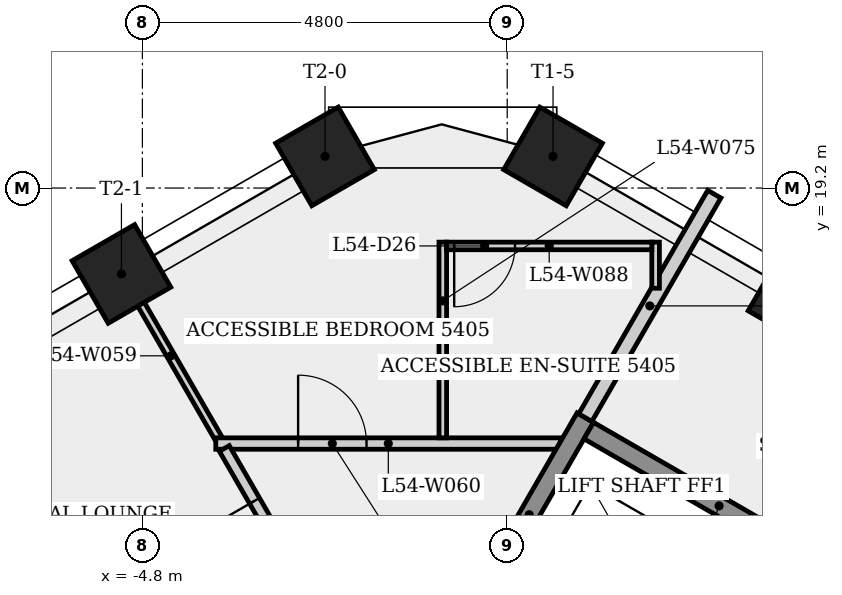
"""IFC4 building model, lengths in metres.
Left out: names, types, materials, properties, quantities, classifications, styles, units other than length and angle.
Written with IfcOpenShell. Run it as: python <this file> out.ifc"""

import sys

from ifc_helpers import new_model, si_unit, direction, frame, frame_2d, origin, origin_2d, place, context, subcontext, project, spatial, rectangle, extrude, element, fill, save


model = new_model("IFC4")
c1 = context("Model", 3, precision=1e-05, world=origin(), true_north=direction((0.0, 1.0)))
c2 = subcontext(c1, "Body", "Model", "MODEL_VIEW")
j1 = project(units=[si_unit("LENGTHUNIT", "METRE"), si_unit("PLANEANGLEUNIT", "RADIAN")], contexts=[c1])
p1 = place(None, origin())
s1 = spatial("IfcSite", under=j1, at=p1, CompositionType="ELEMENT")
p2 = place(p1, origin())
s2 = spatial("IfcBuilding", under=s1, at=p2, CompositionType="ELEMENT")
p3 = place(p2, frame((0.0, 0.0, 202.1)))
s3 = spatial("IfcBuildingStorey", under=s2, at=p3, CompositionType="ELEMENT", Elevation=202.1)
for number, where, z_axis, x_axis in (
    (1, (3.82, 17.759, 0.0), (0.0, 0.0, 1.0), (0.5, 0.866, 0.0)),
    (2, (0.603, 19.616, 0.0), (0.0, 0.0, 1.0), (0.5, 0.866, 0.0)),
    (3, (-2.397, 19.616, 0.0), (0.0, 0.0, 1.0), (-0.5, 0.866, 0.0)),
    (4, (-5.076, 18.07, 0.0), (0.0, 0.0, 1.0), (-0.5, 0.866, 0.0)),
):
    element("IfcColumn", number, at=place(p3, frame(where, z_axis=z_axis, x_axis=x_axis)), inside=s3, PredefinedType="COLUMN", context=c2, shape_type="SweptSolid", body=[
        extrude(rectangle(XDim=0.95, YDim=0.95, at=origin_2d()), origin(), (0.0, 0.0, 1.0), 4.0),
    ])
p4 = place(p3, frame((-4.266, 10.498, 0.0), z_axis=(0.0, 0.0, 1.0), x_axis=(-0.499997697262, 0.866026733267, 0.0)))
e5 = element("IfcWall", 5, at=p4, inside=s3, PredefinedType="PARTITIONING", context=c2, shape_type="SweptSolid", body=[
    extrude(rectangle(XDim=6.961, YDim=0.1, at=frame_2d((3.481, 0.0))), origin(), (0.0, 0.0, 1.0), 3.6),
])
p5 = place(p3, frame((-3.797, 15.903, 0.0), z_axis=(0.0, 0.0, 1.0), x_axis=(-0.499980071345, 0.866036909293, 0.0)))
e6 = element("IfcWall", 6, at=p5, inside=s3, PredefinedType="PARTITIONING", context=c2, shape_type="SweptSolid", body=[
    extrude(rectangle(XDim=2.516, YDim=0.1, at=frame_2d((1.258, 0.0))), origin(), (0.0, 0.0, 1.0), 3.6),
])
p6 = place(p3, frame((-3.834, 15.838, 0.0), z_axis=(0.0, 0.0, 1.0), x_axis=(1.0, 0.0, 0.0)))
e7 = element("IfcWall", 7, at=p6, inside=s3, PredefinedType="PARTITIONING", context=c2, shape_type="SweptSolid", body=[
    extrude(rectangle(XDim=4.54, YDim=0.15, at=frame_2d((2.27, 0.0))), origin(), (0.0, 0.0, 1.0), 3.6),
])
p7 = place(p6, frame((1.083, 0.0, 0.0)))
e8 = element("IfcOpeningElement", 8, at=p7, cuts=e7, PredefinedType="OPENING", context=c2, shape_type="SweptSolid", body=[
    extrude(rectangle(XDim=0.9, YDim=2.1, at=frame_2d((0.45, 1.05))), frame((0.0, 0.085, 0.0), z_axis=(0.0, -1.0, 0.0), x_axis=(1.0, 0.0, 0.0)), (0.0, 0.0, 1.0), 0.17),
])
p8 = place(p3, frame((-2.426, 13.529, 0.0), z_axis=(0.0, 0.0, 1.0), x_axis=(-0.49996987118, 0.866042797968, 0.0)))
e9 = element("IfcWall", 9, at=p8, inside=s3, PredefinedType="PARTITIONING", context=c2, shape_type="SweptSolid", body=[
    extrude(rectangle(XDim=2.591, YDim=0.15, at=frame_2d((1.295, 0.0))), origin(), (0.0, 0.0, 1.0), 3.6),
])
p9 = place(p8, frame((0.795, 0.0, 0.0)))
e10 = element("IfcOpeningElement", 10, at=p9, cuts=e9, PredefinedType="OPENING", context=c2, shape_type="SweptSolid", body=[
    extrude(rectangle(XDim=1.0, YDim=2.1, at=frame_2d((0.5, 1.05))), frame((0.0, 0.085, 0.0), z_axis=(0.0, -1.0, 0.0), x_axis=(1.0, 0.0, 0.0)), (0.0, 0.0, 1.0), 0.17),
])
p10 = place(p3, frame((-0.848, 18.488, 0.0), z_axis=(0.0, 0.0, 1.0), x_axis=(0.0, -1.0, 0.0)))
e11 = element("IfcWall", 11, at=p10, inside=s3, PredefinedType="PARTITIONING", context=c2, shape_type="SweptSolid", body=[
    extrude(rectangle(XDim=2.575, YDim=0.1, at=frame_2d((1.288, 0.0))), origin(), (0.0, 0.0, 1.0), 3.6),
])
p11 = place(p3, frame((-0.448, 13.624, 0.0), z_axis=(0.0, 0.0, 1.0), x_axis=(0.500037662692, 0.866003658127, 0.0)))
e12 = element("IfcWall", 12, at=p11, inside=s3, PredefinedType="SHEAR", context=c2, shape_type="SweptSolid", body=[
    extrude(rectangle(XDim=2.95, YDim=0.25, at=frame_2d((1.475, 0.0))), origin(), (0.0, 0.0, 1.0), 3.6),
])
p12 = place(p3, frame((1.073, 16.008, 0.0), z_axis=(0.0, 0.0, 1.0), x_axis=(0.866040211805, -0.499974350878, 0.0)))
e13 = element("IfcWall", 13, at=p12, inside=s3, PredefinedType="SHEAR", context=c2, shape_type="SweptSolid", body=[
    extrude(rectangle(XDim=3.3, YDim=0.25, at=frame_2d((1.65, 0.0))), origin(), (0.0, 0.0, 1.0), 3.6),
])
p13 = place(p3, frame((1.027, 16.179, 0.0), z_axis=(0.0, 0.0, 1.0), x_axis=(0.499967283419, 0.866044291888, 0.0)))
e14 = element("IfcWall", 14, at=p13, inside=s3, PredefinedType="PLUMBINGWALL", context=c2, shape_type="SweptSolid", body=[
    extrude(rectangle(XDim=3.395, YDim=0.2, at=frame_2d((1.698, 0.0))), origin(), (0.0, 0.0, 1.0), 3.6),
])
p14 = place(p3, frame((1.952, 17.882, 0.0), z_axis=(0.0, 0.0, 1.0), x_axis=(0.0, 1.0, 0.0)))
e15 = element("IfcWall", 15, at=p14, inside=s3, PredefinedType="PARTITIONING", context=c2, shape_type="SweptSolid", body=[
    extrude(rectangle(XDim=0.606, YDim=0.1, at=frame_2d((0.303, 0.0))), origin(), (0.0, 0.0, 1.0), 3.6),
])
p15 = place(p3, frame((1.902, 18.438, 0.0), z_axis=(0.0, 0.0, 1.0), x_axis=(-1.0, 0.0, 0.0)))
e16 = element("IfcWall", 16, at=p15, inside=s3, PredefinedType="PARTITIONING", context=c2, shape_type="SweptSolid", body=[
    extrude(rectangle(XDim=2.7, YDim=0.1, at=frame_2d((1.35, 0.0))), origin(), (0.0, 0.0, 1.0), 3.6),
])
p16 = place(p15, frame((1.8, 0.0, 0.0)))
e17 = element("IfcOpeningElement", 17, at=p16, cuts=e16, PredefinedType="OPENING", context=c2, shape_type="SweptSolid", body=[
    extrude(rectangle(XDim=0.8, YDim=2.1, at=frame_2d((0.4, 1.05))), frame((0.0, 0.06, 0.0), z_axis=(0.0, -1.0, 0.0), x_axis=(1.0, 0.0, 0.0)), (0.0, 0.0, 1.0), 0.12),
])
p17 = place(p7, origin())
e18 = element("IfcDoor", 18, at=p17, inside=s3, OperationType="SINGLE_SWING_LEFT", PredefinedType="DOOR", context=c2, shape_type="SweptSolid", body=[
    extrude(rectangle(XDim=0.9, YDim=2.1, at=frame_2d((0.45, 1.05))), frame((0.0, 0.025, 0.0), z_axis=(0.0, -1.0, 0.0), x_axis=(1.0, 0.0, 0.0)), (0.0, 0.0, 1.0), 0.05),
])
fill(e8, e18)
p18 = place(p16, origin())
e19 = element("IfcDoor", 19, at=p18, inside=s3, OperationType="SINGLE_SWING_RIGHT", PredefinedType="DOOR", context=c2, shape_type="SweptSolid", body=[
    extrude(rectangle(XDim=0.8, YDim=2.1, at=frame_2d((0.4, 1.05))), frame((0.0, 0.025, 0.0), z_axis=(0.0, -1.0, 0.0), x_axis=(1.0, 0.0, 0.0)), (0.0, 0.0, 1.0), 0.05),
])
fill(e17, e19)
p19 = place(p9, origin())
e20 = element("IfcDoor", 20, at=p19, inside=s3, OperationType="SINGLE_SWING_RIGHT", PredefinedType="DOOR", context=c2, shape_type="SweptSolid", body=[
    extrude(rectangle(XDim=1.0, YDim=2.1, at=frame_2d((0.5, 1.05))), frame((0.0, 0.025, 0.0), z_axis=(0.0, -1.0, 0.0), x_axis=(1.0, 0.0, 0.0)), (0.0, 0.0, 1.0), 0.05),
])
fill(e10, e20)
save(model, sys.argv[1])
